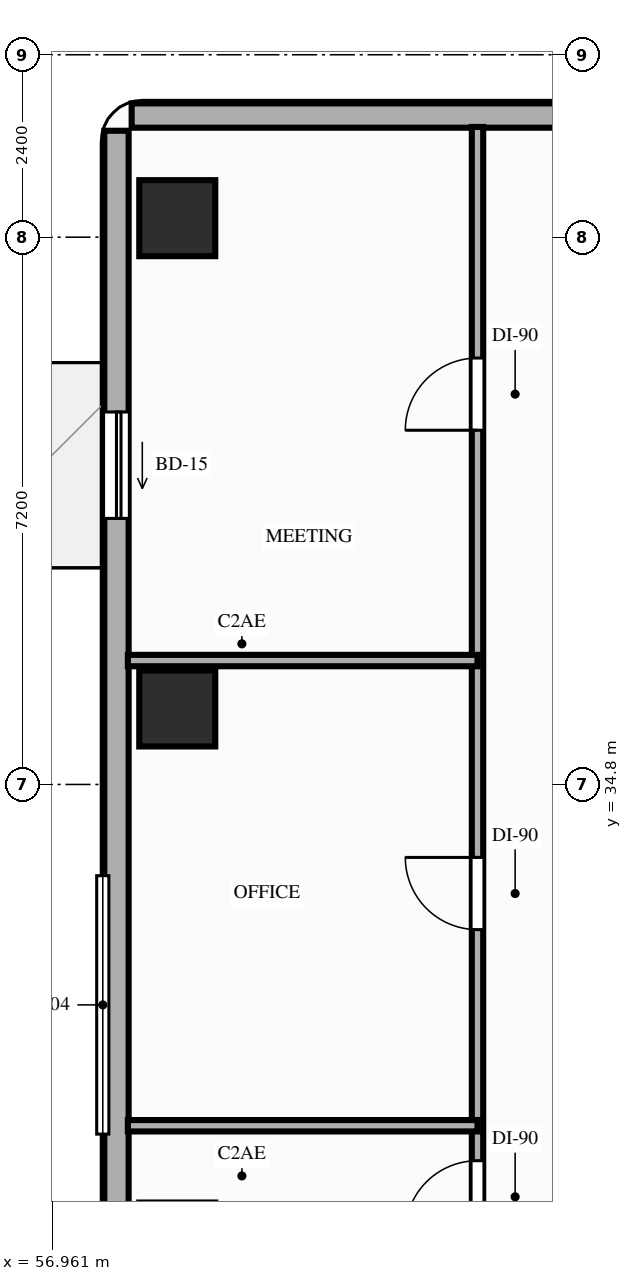
"""IFC4 building model, lengths in metres.
Left out: names, types, materials, properties, quantities, classifications, styles, units other than length and angle.
Written with IfcOpenShell. Run it as: python <this file> out.ifc"""

import sys

from ifc_helpers import new_model, si_unit, direction, frame, frame_2d, origin, origin_2d, place, context, subcontext, project, spatial, rectangle, extrude, element, fill, save


model = new_model("IFC4")
c1 = context("Model", 3, precision=1e-05, world=origin(), true_north=direction((0.0, 1.0)))
c2 = subcontext(c1, "Body", "Model", "MODEL_VIEW")
j1 = project(units=[si_unit("LENGTHUNIT", "METRE"), si_unit("PLANEANGLEUNIT", "RADIAN")], contexts=[c1])
p1 = place(None, origin())
s1 = spatial("IfcSite", under=j1, at=p1, CompositionType="ELEMENT")
p2 = place(p1, origin())
s2 = spatial("IfcBuilding", under=s1, at=p2, CompositionType="ELEMENT")
p3 = place(p2, frame((0.0, 0.0, 36.6)))
s3 = spatial("IfcBuildingStorey", under=s2, at=p3, CompositionType="ELEMENT", Elevation=36.6)
for number, where, z_axis, x_axis in (
    (1, (58.6, 35.8, 0.0), (0.0, 0.0, 1.0), (1.0, 0.0, 0.0)),
    (2, (58.6, 42.25, 0.0), (0.0, 0.0, 1.0), (1.0, 0.0, 0.0)),
):
    element("IfcColumn", number, at=place(p3, frame(where, z_axis=z_axis, x_axis=x_axis)), inside=s3, PredefinedType="COLUMN", context=c2, shape_type="SweptSolid", body=[
        extrude(rectangle(XDim=1.0, YDim=1.0, at=origin_2d()), origin(), (0.0, 0.0, 1.0), 3.2),
    ])
p4 = place(p3, frame((57.8, 43.4, 0.0), z_axis=(0.0, 0.0, 1.0), x_axis=(0.0, -1.0, 0.0)))
e3 = element("IfcWall", 3, at=p4, inside=s3, PredefinedType="STANDARD", context=c2, shape_type="SweptSolid", body=[
    extrude(rectangle(XDim=22.6, YDim=0.32, at=frame_2d((11.3, 0.0))), origin(), (0.0, 0.0, 1.0), 2.45),
])
p5 = place(p4, frame((3.7, 0.0, 0.0)))
e4 = element("IfcOpeningElement", 4, at=p5, cuts=e3, PredefinedType="OPENING", context=c2, shape_type="SweptSolid", body=[
    extrude(rectangle(XDim=1.4, YDim=2.1, at=frame_2d((0.7, 1.05))), frame((0.0, 0.17, 0.0), z_axis=(0.0, -1.0, 0.0), x_axis=(1.0, 0.0, 0.0)), (0.0, 0.0, 1.0), 0.34),
])
p6 = place(p3, frame((72.8, 43.6, 0.0), z_axis=(0.0, 0.0, 1.0), x_axis=(-1.0, 0.0, 0.0)))
e5 = element("IfcWall", 5, at=p6, inside=s3, PredefinedType="STANDARD", context=c2, shape_type="SweptSolid", body=[
    extrude(rectangle(XDim=14.8, YDim=0.32, at=frame_2d((7.4, 0.0))), origin(), (0.0, 0.0, 1.0), 2.96),
])
p7 = place(p3, frame((62.55, 20.75, 0.0), z_axis=(0.0, 0.0, 1.0), x_axis=(0.0, 1.0, 0.0)))
e6 = element("IfcWall", 6, at=p7, inside=s3, PredefinedType="PARTITIONING", context=c2, shape_type="SweptSolid", body=[
    extrude(rectangle(XDim=22.7, YDim=0.15, at=frame_2d((11.35, 0.0))), origin(), (0.0, 0.0, 1.0), 2.45),
])
p8 = place(p7, frame((1.05, 0.0, 0.0)))
e7 = element("IfcOpeningElement", 7, at=p8, cuts=e6, PredefinedType="OPENING", context=c2, shape_type="SweptSolid", body=[
    extrude(rectangle(XDim=0.85, YDim=2.1, at=frame_2d((0.425, 1.05))), frame((0.0, 0.085, 0.0), z_axis=(0.0, -1.0, 0.0), x_axis=(1.0, 0.0, 0.0)), (0.0, 0.0, 1.0), 0.17),
])
p9 = place(p7, frame((3.43, 0.0, 0.0)))
e8 = element("IfcOpeningElement", 8, at=p9, cuts=e6, PredefinedType="OPENING", context=c2, shape_type="SweptSolid", body=[
    extrude(rectangle(XDim=0.95, YDim=2.1, at=frame_2d((0.475, 1.05))), frame((0.0, 0.085, 0.0), z_axis=(0.0, -1.0, 0.0), x_axis=(1.0, 0.0, 0.0)), (0.0, 0.0, 1.0), 0.17),
])
p10 = place(p7, frame((8.15, 0.0, 0.0)))
e9 = element("IfcOpeningElement", 9, at=p10, cuts=e6, PredefinedType="OPENING", context=c2, shape_type="SweptSolid", body=[
    extrude(rectangle(XDim=0.95, YDim=2.15, at=frame_2d((0.475, 1.075))), frame((0.0, 0.085, 0.0), z_axis=(0.0, -1.0, 0.0), x_axis=(1.0, 0.0, 0.0)), (0.0, 0.0, 1.0), 0.17),
])
p11 = place(p7, frame((12.14, 0.0, 0.0)))
e10 = element("IfcOpeningElement", 10, at=p11, cuts=e6, PredefinedType="OPENING", context=c2, shape_type="SweptSolid", body=[
    extrude(rectangle(XDim=0.95, YDim=2.15, at=frame_2d((0.475, 1.075))), frame((0.0, 0.085, 0.0), z_axis=(0.0, -1.0, 0.0), x_axis=(1.0, 0.0, 0.0)), (0.0, 0.0, 1.0), 0.17),
])
p12 = place(p7, frame((18.71, 0.0, 0.0)))
e11 = element("IfcOpeningElement", 11, at=p12, cuts=e6, PredefinedType="OPENING", context=c2, shape_type="SweptSolid", body=[
    extrude(rectangle(XDim=0.95, YDim=2.15, at=frame_2d((0.475, 1.075))), frame((0.0, 0.085, 0.0), z_axis=(0.0, -1.0, 0.0), x_axis=(1.0, 0.0, 0.0)), (0.0, 0.0, 1.0), 0.17),
])
for number, where, z_axis, x_axis in (
    (12, (57.95, 30.31, 0.0), (0.0, 0.0, 1.0), (1.0, 0.0, 0.0)),
    (13, (57.95, 36.43, 0.0), (0.0, 0.0, 1.0), (1.0, 0.0, 0.0)),
):
    element("IfcWall", number, at=place(p3, frame(where, z_axis=z_axis, x_axis=x_axis)), inside=s3, PredefinedType="PARTITIONING", context=c2, shape_type="SweptSolid", body=[
        extrude(rectangle(XDim=4.6, YDim=0.15, at=frame_2d((2.3, 0.0))), origin(), (0.0, 0.0, 1.0), 2.45),
    ])
p13 = place(p5, origin())
e14 = element("IfcDoor", 14, at=p13, inside=s3, OperationType="SLIDING_TO_RIGHT", PredefinedType="DOOR", context=c2, shape_type="SweptSolid", body=[
    extrude(rectangle(XDim=1.4, YDim=2.1, at=frame_2d((0.7, 1.05))), frame((0.0, 0.025, 0.0), z_axis=(0.0, -1.0, 0.0), x_axis=(1.0, 0.0, 0.0)), (0.0, 0.0, 1.0), 0.05),
])
fill(e4, e14)
p14 = place(p10, origin())
e15 = element("IfcDoor", 15, at=p14, inside=s3, OperationType="SINGLE_SWING_LEFT", PredefinedType="DOOR", context=c2, shape_type="SweptSolid", body=[
    extrude(rectangle(XDim=0.95, YDim=2.15, at=frame_2d((0.475, 1.075))), frame((0.0, 0.025, 0.0), z_axis=(0.0, -1.0, 0.0), x_axis=(1.0, 0.0, 0.0)), (0.0, 0.0, 1.0), 0.05),
])
fill(e9, e15)
p15 = place(p11, origin())
e16 = element("IfcDoor", 16, at=p15, inside=s3, OperationType="SINGLE_SWING_RIGHT", PredefinedType="DOOR", context=c2, shape_type="SweptSolid", body=[
    extrude(rectangle(XDim=0.95, YDim=2.15, at=frame_2d((0.475, 1.075))), frame((0.0, 0.025, 0.0), z_axis=(0.0, -1.0, 0.0), x_axis=(1.0, 0.0, 0.0)), (0.0, 0.0, 1.0), 0.05),
])
fill(e10, e16)
p16 = place(p12, origin())
e17 = element("IfcDoor", 17, at=p16, inside=s3, OperationType="SINGLE_SWING_LEFT", PredefinedType="DOOR", context=c2, shape_type="SweptSolid", body=[
    extrude(rectangle(XDim=0.95, YDim=2.15, at=frame_2d((0.475, 1.075))), frame((0.0, 0.025, 0.0), z_axis=(0.0, -1.0, 0.0), x_axis=(1.0, 0.0, 0.0)), (0.0, 0.0, 1.0), 0.05),
])
fill(e11, e17)
save(model, sys.argv[1])
